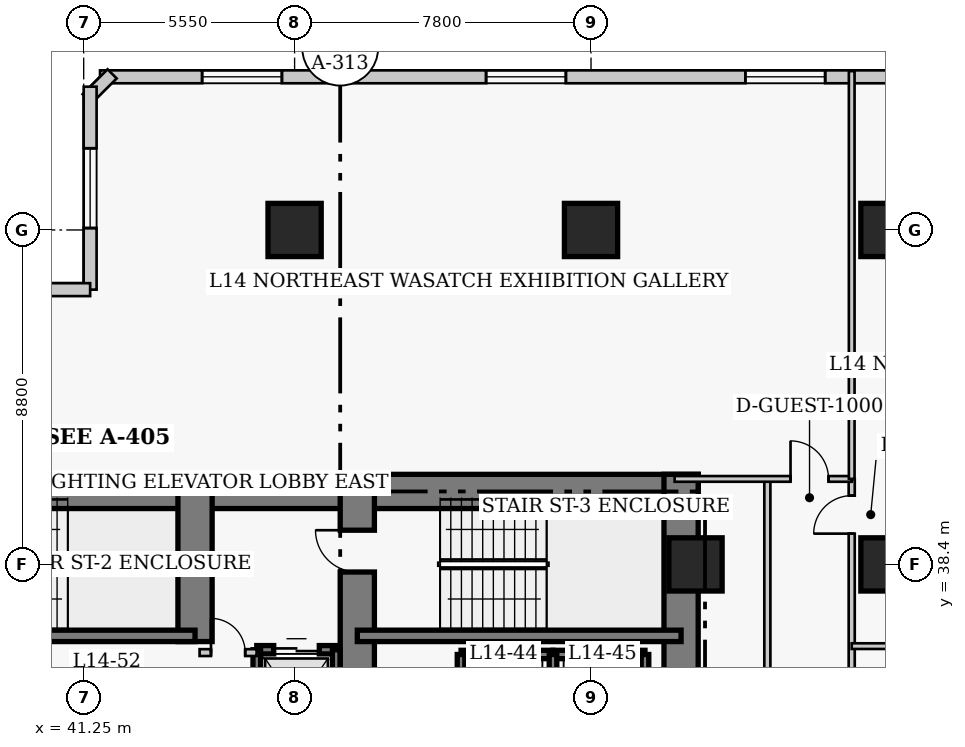
"""IFC4 building model, lengths in metres.
Left out: names, types, materials, properties, quantities, classifications, styles, units other than length and angle.
Written with IfcOpenShell. Run it as: python <this file> out.ifc"""

import sys

from ifc_helpers import new_model, si_unit, direction, frame, frame_2d, origin, origin_2d, place, context, subcontext, project, spatial, rectangle, extrude, element, fill, save


model = new_model("IFC4")
c1 = context("Model", 3, precision=1e-05, world=origin(), true_north=direction((0.0, 1.0)))
c2 = subcontext(c1, "Body", "Model", "MODEL_VIEW")
j1 = project(units=[si_unit("LENGTHUNIT", "METRE"), si_unit("PLANEANGLEUNIT", "RADIAN")], contexts=[c1])
p1 = place(None, origin())
s1 = spatial("IfcSite", under=j1, at=p1, CompositionType="ELEMENT")
p2 = place(p1, origin())
s2 = spatial("IfcBuilding", under=s1, at=p2, CompositionType="ELEMENT")
p3 = place(p2, frame((0.0, 0.0, 60.2)))
s3 = spatial("IfcBuildingStorey", under=s2, at=p3, CompositionType="ELEMENT", Elevation=60.2)
p4 = place(p3, frame((35.85, 40.32, 0.0), z_axis=(0.0, 0.0, 1.0), x_axis=(1.0, 0.0, 0.0)))
e1 = element("IfcWall", 1, at=p4, inside=s3, PredefinedType="SHEAR", context=c2, shape_type="SweptSolid", body=[
    extrude(rectangle(XDim=12.6, YDim=0.9, at=frame_2d((6.3, 0.0))), origin(), (0.0, 0.0, 1.0), 3.8),
])
p5 = place(p3, frame((48.45, 40.32, 0.0), z_axis=(0.0, 0.0, 1.0), x_axis=(1.0, 0.0, 0.0)))
e2 = element("IfcWall", 2, at=p5, inside=s3, PredefinedType="SHEAR", context=c2, shape_type="SweptSolid", body=[
    extrude(rectangle(XDim=8.97, YDim=0.9, at=frame_2d((4.485, 0.0))), origin(), (0.0, 0.0, 1.0), 3.8),
])
p6 = place(p3, frame((56.97, 27.05, 0.0), z_axis=(0.0, 0.0, 1.0), x_axis=(0.0, 1.0, 0.0)))
e3 = element("IfcWall", 3, at=p6, inside=s3, PredefinedType="SHEAR", context=c2, shape_type="SweptSolid", body=[
    extrude(rectangle(XDim=13.72, YDim=0.9, at=frame_2d((6.86, 0.0))), origin(), (0.0, 0.0, 1.0), 3.8),
])
p7 = place(p3, frame((44.18, 36.37, 0.0), z_axis=(0.0, 0.0, 1.0), x_axis=(0.0, 1.0, 0.0)))
e4 = element("IfcWall", 4, at=p7, inside=s3, PredefinedType="SHEAR", context=c2, shape_type="SweptSolid", body=[
    extrude(rectangle(XDim=3.95, YDim=0.9, at=frame_2d((1.975, 0.0))), origin(), (0.0, 0.0, 1.0), 3.8),
])
p8 = place(p3, frame((48.45, 32.3, 0.0), z_axis=(0.0, 0.0, 1.0), x_axis=(0.0, 1.0, 0.0)))
e5 = element("IfcWall", 5, at=p8, inside=s3, PredefinedType="SHEAR", context=c2, shape_type="SweptSolid", body=[
    extrude(rectangle(XDim=8.02, YDim=0.9, at=frame_2d((4.01, 0.0))), origin(), (0.0, 0.0, 1.0), 3.8),
])
p9 = place(p8, frame((5.9, 0.0, 0.0)))
e6 = element("IfcOpeningElement", 6, at=p9, cuts=e5, PredefinedType="OPENING", context=c2, shape_type="SweptSolid", body=[
    extrude(rectangle(XDim=1.1, YDim=2.15, at=frame_2d((0.55, 1.075))), frame((0.0, 0.46, 0.0), z_axis=(0.0, -1.0, 0.0), x_axis=(1.0, 0.0, 0.0)), (0.0, 0.0, 1.0), 0.92),
])
p10 = place(p3, frame((35.85, 36.52, 0.0), z_axis=(0.0, 0.0, 1.0), x_axis=(1.0, 0.0, 0.0)))
e7 = element("IfcWall", 7, at=p10, inside=s3, PredefinedType="SHEAR", context=c2, shape_type="SweptSolid", body=[
    extrude(rectangle(XDim=8.33, YDim=0.3, at=frame_2d((4.165, 0.0))), origin(), (0.0, 0.0, 1.0), 3.8),
])
p11 = place(p3, frame((48.45, 36.52, 0.0), z_axis=(0.0, 0.0, 1.0), x_axis=(1.0, 0.0, 0.0)))
e8 = element("IfcWall", 8, at=p11, inside=s3, PredefinedType="SHEAR", context=c2, shape_type="SweptSolid", body=[
    extrude(rectangle(XDim=8.52, YDim=0.3, at=frame_2d((4.26, 0.0))), origin(), (0.0, 0.0, 1.0), 3.8),
])
for number, where, z_axis, x_axis in (
    (9, (46.8, 47.2, 0.0), (0.0, 0.0, 1.0), (1.0, 0.0, 0.0)),
    (10, (54.6, 47.2, 0.0), (0.0, 0.0, 1.0), (1.0, 0.0, 0.0)),
    (11, (62.4, 38.4, 0.0), (0.0, 0.0, 1.0), (1.0, 0.0, 0.0)),
    (12, (62.4, 47.2, 0.0), (0.0, 0.0, 1.0), (1.0, 0.0, 0.0)),
    (13, (57.35, 38.4, 0.0), (0.0, 0.0, 1.0), (1.0, 0.0, 0.0)),
):
    element("IfcColumn", number, at=place(p3, frame(where, z_axis=z_axis, x_axis=x_axis)), inside=s3, PredefinedType="COLUMN", context=c2, shape_type="SweptSolid", body=[
        extrude(rectangle(XDim=1.4, YDim=1.4, at=origin_2d()), origin(), (0.0, 0.0, 1.0), 3.8),
    ])
p12 = place(p3, frame((71.57, 51.23, 0.0), z_axis=(0.0, 0.0, 1.0), x_axis=(-1.0, 0.0, 0.0)))
e14 = element("IfcWall", 14, at=p12, inside=s3, PredefinedType="SOLIDWALL", context=c2, shape_type="SweptSolid", body=[
    extrude(rectangle(XDim=29.89, YDim=0.34, at=frame_2d((14.945, 0.0))), origin(), (0.0, 0.0, 1.0), 3.54),
])
p13 = place(p12, frame((2.686, 0.0, 0.85)))
e15 = element("IfcOpeningElement", 15, at=p13, cuts=e14, PredefinedType="OPENING", context=c2, shape_type="SweptSolid", body=[
    extrude(rectangle(XDim=2.1, YDim=1.85, at=frame_2d((1.05, 0.925))), frame((0.0, 0.18, 0.0), z_axis=(0.0, -1.0, 0.0), x_axis=(1.0, 0.0, 0.0)), (0.0, 0.0, 1.0), 0.36),
])
p14 = place(p12, frame((10.809, 0.0, 0.85)))
e16 = element("IfcOpeningElement", 16, at=p14, cuts=e14, PredefinedType="OPENING", context=c2, shape_type="SweptSolid", body=[
    extrude(rectangle(XDim=2.1, YDim=1.85, at=frame_2d((1.05, 0.925))), frame((0.0, 0.18, 0.0), z_axis=(0.0, -1.0, 0.0), x_axis=(1.0, 0.0, 0.0)), (0.0, 0.0, 1.0), 0.36),
])
p15 = place(p12, frame((17.631, 0.0, 0.85)))
e17 = element("IfcOpeningElement", 17, at=p15, cuts=e14, PredefinedType="OPENING", context=c2, shape_type="SweptSolid", body=[
    extrude(rectangle(XDim=2.1, YDim=1.85, at=frame_2d((1.05, 0.925))), frame((0.0, 0.18, 0.0), z_axis=(0.0, -1.0, 0.0), x_axis=(1.0, 0.0, 0.0)), (0.0, 0.0, 1.0), 0.36),
])
p16 = place(p12, frame((25.104, 0.0, 0.85)))
e18 = element("IfcOpeningElement", 18, at=p16, cuts=e14, PredefinedType="OPENING", context=c2, shape_type="SweptSolid", body=[
    extrude(rectangle(XDim=2.1, YDim=1.85, at=frame_2d((1.05, 0.925))), frame((0.0, 0.18, 0.0), z_axis=(0.0, -1.0, 0.0), x_axis=(1.0, 0.0, 0.0)), (0.0, 0.0, 1.0), 0.36),
])
p17 = place(p3, frame((41.999, 51.308, 0.0), z_axis=(0.0, 0.0, 1.0), x_axis=(-0.707238225886, -0.706975312048, 0.0)))
e19 = element("IfcWall", 19, at=p17, inside=s3, PredefinedType="SOLIDWALL", context=c2, shape_type="SweptSolid", body=[
    extrude(rectangle(XDim=0.929, YDim=0.34, at=frame_2d((0.464, 0.0))), origin(), (0.0, 0.0, 1.0), 3.54),
])
p18 = place(p3, frame((41.42, 50.97, 0.0), z_axis=(0.0, 0.0, 1.0), x_axis=(0.0, -1.0, 0.0)))
e20 = element("IfcWall", 20, at=p18, inside=s3, PredefinedType="SOLIDWALL", context=c2, shape_type="SweptSolid", body=[
    extrude(rectangle(XDim=5.34, YDim=0.34, at=frame_2d((2.67, 0.0))), origin(), (0.0, 0.0, 1.0), 3.54),
])
p19 = place(p18, frame((1.62, 0.0, 0.85)))
e21 = element("IfcOpeningElement", 21, at=p19, cuts=e20, PredefinedType="OPENING", context=c2, shape_type="SweptSolid", body=[
    extrude(rectangle(XDim=2.1, YDim=1.85, at=frame_2d((1.05, 0.925))), frame((0.0, 0.18, 0.0), z_axis=(0.0, -1.0, 0.0), x_axis=(1.0, 0.0, 0.0)), (0.0, 0.0, 1.0), 0.36),
])
p20 = place(p3, frame((41.42, 45.63, 0.0), z_axis=(0.0, 0.0, 1.0), x_axis=(-1.0, 0.0, 0.0)))
e22 = element("IfcWall", 22, at=p20, inside=s3, PredefinedType="SOLIDWALL", context=c2, shape_type="SweptSolid", body=[
    extrude(rectangle(XDim=4.84, YDim=0.34, at=frame_2d((2.42, 0.0))), origin(), (0.0, 0.0, 1.0), 3.54),
])
p21 = place(p20, frame((1.37, 0.0, 0.85)))
e23 = element("IfcOpeningElement", 23, at=p21, cuts=e22, PredefinedType="OPENING", context=c2, shape_type="SweptSolid", body=[
    extrude(rectangle(XDim=2.1, YDim=1.85, at=frame_2d((1.05, 0.925))), frame((0.0, 0.18, 0.0), z_axis=(0.0, -1.0, 0.0), x_axis=(1.0, 0.0, 0.0)), (0.0, 0.0, 1.0), 0.36),
])
p22 = place(p3, frame((51.18, 36.03, 0.0), z_axis=(0.0, 0.0, 1.0), x_axis=(1.0, 0.0, 0.0)))
e24 = element("IfcWall", 24, at=p22, inside=s3, PredefinedType="SHEAR", context=c2, shape_type="SweptSolid", body=[
    extrude(rectangle(XDim=2.42, YDim=0.22, at=frame_2d((1.21, 0.0))), origin(), (0.0, 0.0, 1.0), 3.8),
])
p23 = place(p3, frame((51.18, 33.17, 0.0), z_axis=(0.0, 0.0, 1.0), x_axis=(0.0, 1.0, 0.0)))
e25 = element("IfcWall", 25, at=p23, inside=s3, PredefinedType="SHEAR", context=c2, shape_type="SweptSolid", body=[
    extrude(rectangle(XDim=2.86, YDim=0.2, at=frame_2d((1.43, 0.0))), origin(), (0.0, 0.0, 1.0), 3.8),
])
p24 = place(p3, frame((53.6, 36.03, 0.0), z_axis=(0.0, 0.0, 1.0), x_axis=(1.0, 0.0, 0.0)))
e26 = element("IfcWall", 26, at=p24, inside=s3, PredefinedType="SHEAR", context=c2, shape_type="SweptSolid", body=[
    extrude(rectangle(XDim=2.42, YDim=0.22, at=frame_2d((1.21, 0.0))), origin(), (0.0, 0.0, 1.0), 3.8),
])
for number, where, z_axis, x_axis in (
    (27, (53.6, 33.17, 0.0), (0.0, 0.0, 1.0), (0.0, 1.0, 0.0)),
    (28, (56.02, 33.17, 0.0), (0.0, 0.0, 1.0), (0.0, 1.0, 0.0)),
):
    element("IfcWall", number, at=place(p3, frame(where, z_axis=z_axis, x_axis=x_axis)), inside=s3, PredefinedType="SHEAR", context=c2, shape_type="SweptSolid", body=[
        extrude(rectangle(XDim=2.86, YDim=0.2, at=frame_2d((1.43, 0.0))), origin(), (0.0, 0.0, 1.0), 3.8),
    ])
p25 = place(p3, frame((45.805, 36.155, 0.0), z_axis=(0.0, 0.0, 1.0), x_axis=(1.0, 0.0, 0.0)))
e29 = element("IfcWall", 29, at=p25, inside=s3, PredefinedType="SHEAR", context=c2, shape_type="SweptSolid", body=[
    extrude(rectangle(XDim=2.09, YDim=0.22, at=frame_2d((1.045, 0.0))), origin(), (0.0, 0.0, 1.0), 3.8),
])
p26 = place(p25, frame((0.445, 0.0, 0.0)))
e30 = element("IfcOpeningElement", 30, at=p26, cuts=e29, PredefinedType="OPENING", context=c2, shape_type="SweptSolid", body=[
    extrude(rectangle(XDim=1.2, YDim=2.15, at=frame_2d((0.6, 1.075))), frame((0.0, 0.12, 0.0), z_axis=(0.0, -1.0, 0.0), x_axis=(1.0, 0.0, 0.0)), (0.0, 0.0, 1.0), 0.24),
])
p27 = place(p3, frame((45.805, 32.65, 0.0), z_axis=(0.0, 0.0, 1.0), x_axis=(0.0, 1.0, 0.0)))
e31 = element("IfcWall", 31, at=p27, inside=s3, PredefinedType="SHEAR", context=c2, shape_type="SweptSolid", body=[
    extrude(rectangle(XDim=3.505, YDim=0.2, at=frame_2d((1.752, 0.0))), origin(), (0.0, 0.0, 1.0), 3.8),
])
p28 = place(p3, frame((47.895, 33.245, 0.0), z_axis=(0.0, 0.0, 1.0), x_axis=(0.0, 1.0, 0.0)))
e32 = element("IfcWall", 32, at=p28, inside=s3, PredefinedType="SHEAR", context=c2, shape_type="SweptSolid", body=[
    extrude(rectangle(XDim=2.91, YDim=0.2, at=frame_2d((1.455, 0.0))), origin(), (0.0, 0.0, 1.0), 3.8),
])
p29 = place(p3, frame((44.3, 36.08, 0.0), z_axis=(0.0, 0.0, 1.0), x_axis=(1.0, 0.0, 0.0)))
e33 = element("IfcWall", 33, at=p29, inside=s3, PredefinedType="PARTITIONING", context=c2, shape_type="SweptSolid", body=[
    extrude(rectangle(XDim=1.5, YDim=0.18, at=frame_2d((0.75, 0.0))), origin(), (0.0, 0.0, 1.0), 3.54),
])
p30 = place(p29, frame((0.3, 0.0, 0.0)))
e34 = element("IfcOpeningElement", 34, at=p30, cuts=e33, PredefinedType="OPENING", context=c2, shape_type="SweptSolid", body=[
    extrude(rectangle(XDim=0.9, YDim=2.15, at=frame_2d((0.45, 1.075))), frame((0.0, 0.1, 0.0), z_axis=(0.0, -1.0, 0.0), x_axis=(1.0, 0.0, 0.0)), (0.0, 0.0, 1.0), 0.2),
])
p31 = place(p3, frame((61.46, 10.25, 0.0), z_axis=(0.0, 0.0, 1.0), x_axis=(0.0, 1.0, 0.0)))
e35 = element("IfcWall", 35, at=p31, inside=s3, PredefinedType="PARTITIONING", context=c2, shape_type="SweptSolid", body=[
    extrude(rectangle(XDim=30.4, YDim=0.16, at=frame_2d((15.2, 0.0))), origin(), (0.0, 0.0, 1.0), 3.54),
])
p32 = place(p31, frame((4.4, 0.0, 0.0)))
e36 = element("IfcOpeningElement", 36, at=p32, cuts=e35, PredefinedType="OPENING", context=c2, shape_type="SweptSolid", body=[
    extrude(rectangle(XDim=0.95, YDim=2.1, at=frame_2d((0.475, 1.05))), frame((0.0, 0.09, 0.0), z_axis=(0.0, -1.0, 0.0), x_axis=(1.0, 0.0, 0.0)), (0.0, 0.0, 1.0), 0.18),
])
p33 = place(p31, frame((13.337, 0.0, 0.0)))
e37 = element("IfcOpeningElement", 37, at=p33, cuts=e35, PredefinedType="OPENING", context=c2, shape_type="SweptSolid", body=[
    extrude(rectangle(XDim=0.95, YDim=2.1, at=frame_2d((0.475, 1.05))), frame((0.0, 0.09, 0.0), z_axis=(0.0, -1.0, 0.0), x_axis=(1.0, 0.0, 0.0)), (0.0, 0.0, 1.0), 0.18),
])
p34 = place(p31, frame((21.462, 0.0, 0.0)))
e38 = element("IfcOpeningElement", 38, at=p34, cuts=e35, PredefinedType="OPENING", context=c2, shape_type="SweptSolid", body=[
    extrude(rectangle(XDim=0.95, YDim=2.1, at=frame_2d((0.475, 1.05))), frame((0.0, 0.09, 0.0), z_axis=(0.0, -1.0, 0.0), x_axis=(1.0, 0.0, 0.0)), (0.0, 0.0, 1.0), 0.18),
])
p35 = place(p31, frame((28.96, 0.0, 0.0)))
e39 = element("IfcOpeningElement", 39, at=p35, cuts=e35, PredefinedType="OPENING", context=c2, shape_type="SweptSolid", body=[
    extrude(rectangle(XDim=1.0, YDim=2.15, at=frame_2d((0.5, 1.075))), frame((0.0, 0.09, 0.0), z_axis=(0.0, -1.0, 0.0), x_axis=(1.0, 0.0, 0.0)), (0.0, 0.0, 1.0), 0.18),
])
p36 = place(p3, frame((59.24, 26.26, 0.0), z_axis=(0.0, 0.0, 1.0), x_axis=(0.0, 1.0, 0.0)))
e40 = element("IfcWall", 40, at=p36, inside=s3, PredefinedType="PARTITIONING", context=c2, shape_type="SweptSolid", body=[
    extrude(rectangle(XDim=14.39, YDim=0.16, at=frame_2d((7.195, 0.0))), origin(), (0.0, 0.0, 1.0), 3.54),
])
p37 = place(p3, frame((56.8, 40.65, 0.0), z_axis=(0.0, 0.0, 1.0), x_axis=(1.0, 0.0, 0.0)))
e41 = element("IfcWall", 41, at=p37, inside=s3, PredefinedType="PARTITIONING", context=c2, shape_type="SweptSolid", body=[
    extrude(rectangle(XDim=4.66, YDim=0.15, at=frame_2d((2.33, 0.0))), origin(), (0.0, 0.0, 1.0), 3.54),
])
p38 = place(p37, frame((3.05, 0.0, 0.0)))
e42 = element("IfcOpeningElement", 42, at=p38, cuts=e41, PredefinedType="OPENING", context=c2, shape_type="SweptSolid", body=[
    extrude(rectangle(XDim=1.0, YDim=2.15, at=frame_2d((0.5, 1.075))), frame((0.0, 0.085, 0.0), z_axis=(0.0, -1.0, 0.0), x_axis=(1.0, 0.0, 0.0)), (0.0, 0.0, 1.0), 0.17),
])
p39 = place(p3, frame((61.46, 40.65, 0.0), z_axis=(0.0, 0.0, 1.0), x_axis=(0.0, 1.0, 0.0)))
e43 = element("IfcWall", 43, at=p39, inside=s3, PredefinedType="PARTITIONING", context=c2, shape_type="SweptSolid", body=[
    extrude(rectangle(XDim=10.73, YDim=0.15, at=frame_2d((5.365, 0.0))), origin(), (0.0, 0.0, 1.0), 3.54),
])
p40 = place(p3, frame((61.46, 36.25, 0.0), z_axis=(0.0, 0.0, 1.0), x_axis=(1.0, 0.0, 0.0)))
e44 = element("IfcWall", 44, at=p40, inside=s3, PredefinedType="PARTITIONING", context=c2, shape_type="SweptSolid", body=[
    extrude(rectangle(XDim=3.64, YDim=0.15, at=frame_2d((1.82, 0.0))), origin(), (0.0, 0.0, 1.0), 3.54),
])
p41 = place(p14, origin())
e45 = element("IfcWindow", 45, at=p41, inside=s3, PartitioningType="SINGLE_PANEL", PredefinedType="WINDOW", context=c2, shape_type="SweptSolid", body=[
    extrude(rectangle(XDim=2.1, YDim=1.85, at=frame_2d((1.05, 0.925))), frame((0.0, 0.03, 0.0), z_axis=(0.0, -1.0, 0.0), x_axis=(1.0, 0.0, 0.0)), (0.0, 0.0, 1.0), 0.06),
])
fill(e16, e45)
p42 = place(p15, origin())
e46 = element("IfcWindow", 46, at=p42, inside=s3, PartitioningType="SINGLE_PANEL", PredefinedType="WINDOW", context=c2, shape_type="SweptSolid", body=[
    extrude(rectangle(XDim=2.1, YDim=1.85, at=frame_2d((1.05, 0.925))), frame((0.0, 0.03, 0.0), z_axis=(0.0, -1.0, 0.0), x_axis=(1.0, 0.0, 0.0)), (0.0, 0.0, 1.0), 0.06),
])
fill(e17, e46)
p43 = place(p16, origin())
e47 = element("IfcWindow", 47, at=p43, inside=s3, PartitioningType="SINGLE_PANEL", PredefinedType="WINDOW", context=c2, shape_type="SweptSolid", body=[
    extrude(rectangle(XDim=2.1, YDim=1.85, at=frame_2d((1.05, 0.925))), frame((0.0, 0.03, 0.0), z_axis=(0.0, -1.0, 0.0), x_axis=(1.0, 0.0, 0.0)), (0.0, 0.0, 1.0), 0.06),
])
fill(e18, e47)
p44 = place(p19, origin())
e48 = element("IfcWindow", 48, at=p44, inside=s3, PartitioningType="SINGLE_PANEL", PredefinedType="WINDOW", context=c2, shape_type="SweptSolid", body=[
    extrude(rectangle(XDim=2.1, YDim=1.85, at=frame_2d((1.05, 0.925))), frame((0.0, 0.03, 0.0), z_axis=(0.0, -1.0, 0.0), x_axis=(1.0, 0.0, 0.0)), (0.0, 0.0, 1.0), 0.06),
])
fill(e21, e48)
p45 = place(p26, origin())
e49 = element("IfcDoor", 49, at=p45, inside=s3, OperationType="DOUBLE_DOOR_SLIDING", PredefinedType="DOOR", context=c2, shape_type="SweptSolid", body=[
    extrude(rectangle(XDim=1.2, YDim=2.15, at=frame_2d((0.6, 1.075))), frame((0.0, 0.025, 0.0), z_axis=(0.0, -1.0, 0.0), x_axis=(1.0, 0.0, 0.0)), (0.0, 0.0, 1.0), 0.05),
])
fill(e30, e49)
p46 = place(p30, origin())
e50 = element("IfcDoor", 50, at=p46, inside=s3, OperationType="SINGLE_SWING_LEFT", PredefinedType="DOOR", context=c2, shape_type="SweptSolid", body=[
    extrude(rectangle(XDim=0.9, YDim=2.15, at=frame_2d((0.45, 1.075))), frame((0.0, 0.025, 0.0), z_axis=(0.0, -1.0, 0.0), x_axis=(1.0, 0.0, 0.0)), (0.0, 0.0, 1.0), 0.05),
])
fill(e34, e50)
p47 = place(p38, origin())
e51 = element("IfcDoor", 51, at=p47, inside=s3, OperationType="SINGLE_SWING_LEFT", PredefinedType="DOOR", context=c2, shape_type="SweptSolid", body=[
    extrude(rectangle(XDim=1.0, YDim=2.15, at=frame_2d((0.5, 1.075))), frame((0.0, 0.025, 0.0), z_axis=(0.0, -1.0, 0.0), x_axis=(1.0, 0.0, 0.0)), (0.0, 0.0, 1.0), 0.05),
])
fill(e42, e51)
p48 = place(p35, origin())
e52 = element("IfcDoor", 52, at=p48, inside=s3, OperationType="SINGLE_SWING_LEFT", PredefinedType="DOOR", context=c2, shape_type="SweptSolid", body=[
    extrude(rectangle(XDim=1.0, YDim=2.15, at=frame_2d((0.5, 1.075))), frame((0.0, 0.025, 0.0), z_axis=(0.0, -1.0, 0.0), x_axis=(1.0, 0.0, 0.0)), (0.0, 0.0, 1.0), 0.05),
])
fill(e39, e52)
p49 = place(p9, origin())
e53 = element("IfcDoor", 53, at=p49, inside=s3, OperationType="SINGLE_SWING_RIGHT", PredefinedType="DOOR", context=c2, shape_type="SweptSolid", body=[
    extrude(rectangle(XDim=1.1, YDim=2.15, at=frame_2d((0.55, 1.075))), frame((0.0, 0.025, 0.0), z_axis=(0.0, -1.0, 0.0), x_axis=(1.0, 0.0, 0.0)), (0.0, 0.0, 1.0), 0.05),
])
fill(e6, e53)
save(model, sys.argv[1])
